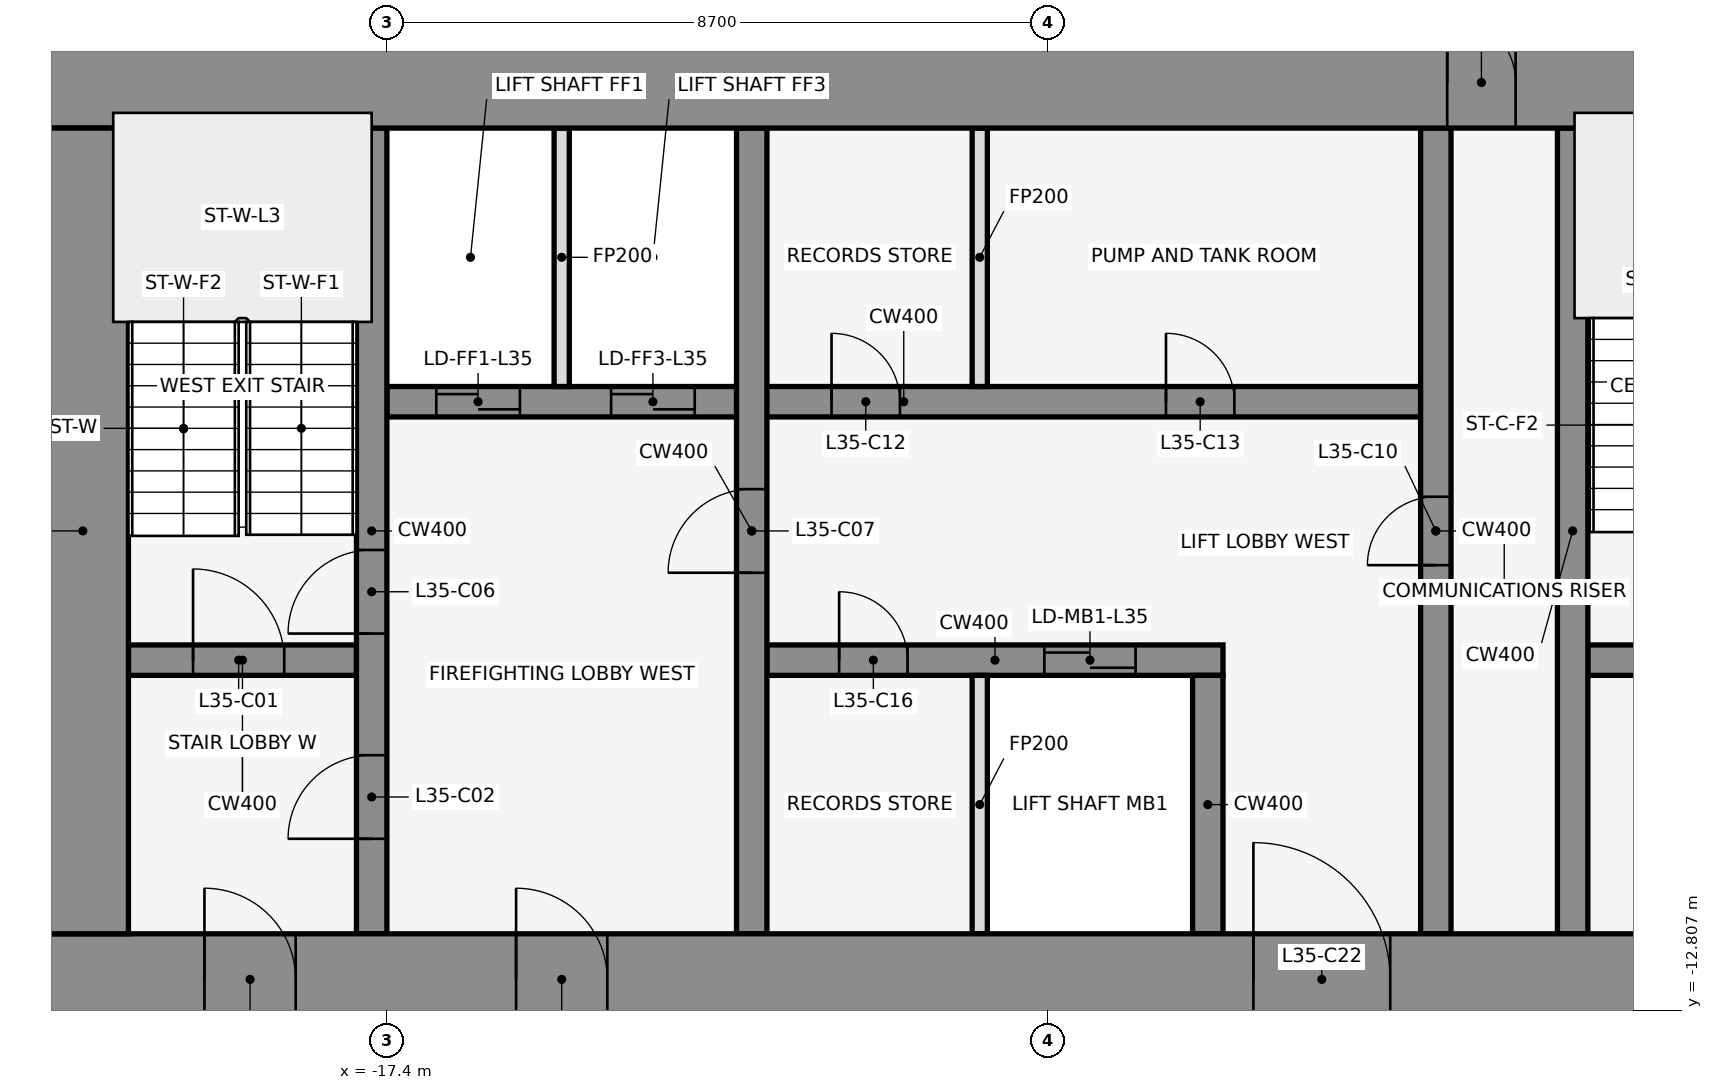
"""IFC4 building model, lengths in metres.
Left out: names, types, materials, properties, quantities, classifications, styles, units other than length and angle.
Written with IfcOpenShell. Run it as: python <this file> out.ifc"""

import sys

from ifc_helpers import new_model, si_unit, direction, frame, frame_2d, origin, place, context, subcontext, project, spatial, rectangle, extrude, element, fill, save


model = new_model("IFC4")
c1 = context("Model", 3, precision=1e-05, world=origin(), true_north=direction((0.0, 1.0)))
c2 = subcontext(c1, "Body", "Model", "MODEL_VIEW")
j1 = project(units=[si_unit("LENGTHUNIT", "METRE"), si_unit("PLANEANGLEUNIT", "RADIAN")], contexts=[c1])
p1 = place(None, origin())
s1 = spatial("IfcSite", under=j1, at=p1, CompositionType="ELEMENT")
p2 = place(p1, origin())
s2 = spatial("IfcBuilding", under=s1, at=p2, CompositionType="ELEMENT")
p3 = place(p2, frame((0.0, 0.0, 160.9)))
s3 = spatial("IfcBuildingStorey", under=s2, at=p3, CompositionType="ELEMENT", Elevation=160.9)
for number, where, z_axis, x_axis in (
    (1, (-0.068, -0.105, 0.0), (0.0, 0.0, 1.0), (-0.84, 0.543, 0.0)),
    (2, (-14.599, 1.08, 0.0), (0.0, 0.0, 1.0), (-0.84, -0.543, 0.0)),
):
    element("IfcWall", number, at=place(p3, frame(where, z_axis=z_axis, x_axis=x_axis)), inside=s3, PredefinedType="STANDARD", context=c2, shape_type="SweptSolid", body=[
        extrude(rectangle(XDim=2.183, YDim=0.25, at=frame_2d((1.091, 0.0))), origin(), (0.0, 0.0, 1.0), 3.95),
    ])
p4 = place(p3, frame((-20.8, -8.2, 0.0), z_axis=(0.0, 0.0, 1.0), x_axis=(1.0, 0.0, 0.0)))
e3 = element("IfcWall", 3, at=p4, inside=s3, PredefinedType="SHEAR", context=c2, shape_type="SweptSolid", body=[
    extrude(rectangle(XDim=3.0, YDim=0.4, at=frame_2d((1.5, 0.0))), origin(), (0.0, 0.0, 1.0), 4.1),
])
p5 = place(p4, frame((0.85, 0.0, 0.0)))
e4 = element("IfcOpeningElement", 4, at=p5, cuts=e3, PredefinedType="OPENING", context=c2, shape_type="SweptSolid", body=[
    extrude(rectangle(XDim=1.2, YDim=2.1, at=frame_2d((0.6, 1.05))), frame((0.0, 0.212, 0.0), z_axis=(0.0, -1.0, 0.0), x_axis=(1.0, 0.0, 0.0)), (0.0, 0.0, 1.0), 0.424),
])
p6 = place(p3, frame((-12.4, -8.2, 0.0), z_axis=(0.0, 0.0, 1.0), x_axis=(1.0, 0.0, 0.0)))
e5 = element("IfcWall", 5, at=p6, inside=s3, PredefinedType="SHEAR", context=c2, shape_type="SweptSolid", body=[
    extrude(rectangle(XDim=6.0, YDim=0.4, at=frame_2d((3.0, 0.0))), origin(), (0.0, 0.0, 1.0), 4.1),
])
p7 = place(p6, frame((3.65, 0.0, 0.0)))
e6 = element("IfcOpeningElement", 6, at=p7, cuts=e5, PredefinedType="OPENING", context=c2, shape_type="SweptSolid", body=[
    extrude(rectangle(XDim=1.2, YDim=2.1, at=frame_2d((0.6, 1.05))), frame((0.0, 0.212, 0.0), z_axis=(0.0, -1.0, 0.0), x_axis=(1.0, 0.0, 0.0)), (0.0, 0.0, 1.0), 0.424),
])
p8 = place(p6, frame((0.95, 0.0, 0.0)))
e7 = element("IfcOpeningElement", 7, at=p8, cuts=e5, PredefinedType="OPENING", context=c2, shape_type="SweptSolid", body=[
    extrude(rectangle(XDim=0.9, YDim=2.1, at=frame_2d((0.45, 1.05))), frame((0.0, 0.212, 0.0), z_axis=(0.0, -1.0, 0.0), x_axis=(1.0, 0.0, 0.0)), (0.0, 0.0, 1.0), 0.424),
])
p9 = place(p3, frame((-1.6, -8.2, 0.0), z_axis=(0.0, 0.0, 1.0), x_axis=(1.0, 0.0, 0.0)))
e8 = element("IfcWall", 8, at=p9, inside=s3, PredefinedType="SHEAR", context=c2, shape_type="SweptSolid", body=[
    extrude(rectangle(XDim=3.2, YDim=0.4, at=frame_2d((1.6, 0.0))), origin(), (0.0, 0.0, 1.0), 4.1),
])
p10 = place(p9, frame((1.05, 0.0, 0.0)))
e9 = element("IfcOpeningElement", 9, at=p10, cuts=e8, PredefinedType="OPENING", context=c2, shape_type="SweptSolid", body=[
    extrude(rectangle(XDim=1.2, YDim=2.1, at=frame_2d((0.6, 1.05))), frame((0.0, 0.212, 0.0), z_axis=(0.0, -1.0, 0.0), x_axis=(1.0, 0.0, 0.0)), (0.0, 0.0, 1.0), 0.424),
])
p11 = place(p3, frame((-17.4, -4.8, 0.0), z_axis=(0.0, 0.0, 1.0), x_axis=(1.0, 0.0, 0.0)))
e10 = element("IfcWall", 10, at=p11, inside=s3, PredefinedType="SHEAR", context=c2, shape_type="SweptSolid", body=[
    extrude(rectangle(XDim=13.6, YDim=0.4, at=frame_2d((6.8, 0.0))), origin(), (0.0, 0.0, 1.0), 4.1),
])
p12 = place(p11, frame((0.65, 0.0, 0.0)))
e11 = element("IfcOpeningElement", 11, at=p12, cuts=e10, PredefinedType="OPENING", context=c2, shape_type="SweptSolid", body=[
    extrude(rectangle(XDim=1.1, YDim=2.1, at=frame_2d((0.55, 1.05))), frame((0.0, 0.212, 0.0), z_axis=(0.0, -1.0, 0.0), x_axis=(1.0, 0.0, 0.0)), (0.0, 0.0, 1.0), 0.424),
])
p13 = place(p11, frame((2.95, 0.0, 0.0)))
e12 = element("IfcOpeningElement", 12, at=p13, cuts=e10, PredefinedType="OPENING", context=c2, shape_type="SweptSolid", body=[
    extrude(rectangle(XDim=1.1, YDim=2.1, at=frame_2d((0.55, 1.05))), frame((0.0, 0.212, 0.0), z_axis=(0.0, -1.0, 0.0), x_axis=(1.0, 0.0, 0.0)), (0.0, 0.0, 1.0), 0.424),
])
p14 = place(p11, frame((5.85, 0.0, 0.0)))
e13 = element("IfcOpeningElement", 13, at=p14, cuts=e10, PredefinedType="OPENING", context=c2, shape_type="SweptSolid", body=[
    extrude(rectangle(XDim=0.9, YDim=2.1, at=frame_2d((0.45, 1.05))), frame((0.0, 0.212, 0.0), z_axis=(0.0, -1.0, 0.0), x_axis=(1.0, 0.0, 0.0)), (0.0, 0.0, 1.0), 0.424),
])
p15 = place(p11, frame((10.25, 0.0, 0.0)))
e14 = element("IfcOpeningElement", 14, at=p15, cuts=e10, PredefinedType="OPENING", context=c2, shape_type="SweptSolid", body=[
    extrude(rectangle(XDim=0.9, YDim=2.1, at=frame_2d((0.45, 1.05))), frame((0.0, 0.212, 0.0), z_axis=(0.0, -1.0, 0.0), x_axis=(1.0, 0.0, 0.0)), (0.0, 0.0, 1.0), 0.424),
])
p16 = place(p3, frame((-17.6, -11.8, 0.0), z_axis=(0.0, 0.0, 1.0), x_axis=(0.0, 1.0, 0.0)))
e15 = element("IfcWall", 15, at=p16, inside=s3, PredefinedType="SHEAR", context=c2, shape_type="SweptSolid", body=[
    extrude(rectangle(XDim=10.6, YDim=0.4, at=frame_2d((5.3, 0.0))), origin(), (0.0, 0.0, 1.0), 4.1),
])
p17 = place(p16, frame((1.25, 0.0, 0.0)))
e16 = element("IfcOpeningElement", 16, at=p17, cuts=e15, PredefinedType="OPENING", context=c2, shape_type="SweptSolid", body=[
    extrude(rectangle(XDim=1.1, YDim=2.1, at=frame_2d((0.55, 1.05))), frame((0.0, 0.212, 0.0), z_axis=(0.0, -1.0, 0.0), x_axis=(1.0, 0.0, 0.0)), (0.0, 0.0, 1.0), 0.424),
])
p18 = place(p16, frame((3.95, 0.0, 0.0)))
e17 = element("IfcOpeningElement", 17, at=p18, cuts=e15, PredefinedType="OPENING", context=c2, shape_type="SweptSolid", body=[
    extrude(rectangle(XDim=1.1, YDim=2.1, at=frame_2d((0.55, 1.05))), frame((0.0, 0.212, 0.0), z_axis=(0.0, -1.0, 0.0), x_axis=(1.0, 0.0, 0.0)), (0.0, 0.0, 1.0), 0.424),
])
p19 = place(p3, frame((-15.1, -4.6, 0.0), z_axis=(0.0, 0.0, 1.0), x_axis=(0.0, 1.0, 0.0)))
e18 = element("IfcWall", 18, at=p19, inside=s3, PredefinedType="PARTITIONING", context=c2, shape_type="SweptSolid", body=[
    extrude(rectangle(XDim=3.4, YDim=0.2, at=frame_2d((1.7, 0.0))), origin(), (0.0, 0.0, 1.0), 2.841),
])
p20 = place(p3, frame((-12.6, -11.8, 0.0), z_axis=(0.0, 0.0, 1.0), x_axis=(0.0, 1.0, 0.0)))
e19 = element("IfcWall", 19, at=p20, inside=s3, PredefinedType="SHEAR", context=c2, shape_type="SweptSolid", body=[
    extrude(rectangle(XDim=10.6, YDim=0.4, at=frame_2d((5.3, 0.0))), origin(), (0.0, 0.0, 1.0), 4.1),
])
p21 = place(p20, frame((4.75, 0.0, 0.0)))
e20 = element("IfcOpeningElement", 20, at=p21, cuts=e19, PredefinedType="OPENING", context=c2, shape_type="SweptSolid", body=[
    extrude(rectangle(XDim=1.1, YDim=2.1, at=frame_2d((0.55, 1.05))), frame((0.0, 0.212, 0.0), z_axis=(0.0, -1.0, 0.0), x_axis=(1.0, 0.0, 0.0)), (0.0, 0.0, 1.0), 0.424),
])
for number, where, z_axis, x_axis in (
    (21, (-9.6, -11.8, 0.0), (0.0, 0.0, 1.0), (0.0, 1.0, 0.0)),
    (22, (-9.6, -4.6, 0.0), (0.0, 0.0, 1.0), (0.0, 1.0, 0.0)),
):
    element("IfcWall", number, at=place(p3, frame(where, z_axis=z_axis, x_axis=x_axis)), inside=s3, PredefinedType="PARTITIONING", context=c2, shape_type="SweptSolid", body=[
        extrude(rectangle(XDim=3.4, YDim=0.2, at=frame_2d((1.7, 0.0))), origin(), (0.0, 0.0, 1.0), 2.841),
    ])
p22 = place(p3, frame((-6.6, -11.8, 0.0), z_axis=(0.0, 0.0, 1.0), x_axis=(0.0, 1.0, 0.0)))
e23 = element("IfcWall", 23, at=p22, inside=s3, PredefinedType="SHEAR", context=c2, shape_type="SweptSolid", body=[
    extrude(rectangle(XDim=3.4, YDim=0.4, at=frame_2d((1.7, 0.0))), origin(), (0.0, 0.0, 1.0), 4.1),
])
p23 = place(p3, frame((-3.6, -11.8, 0.0), z_axis=(0.0, 0.0, 1.0), x_axis=(0.0, 1.0, 0.0)))
e24 = element("IfcWall", 24, at=p23, inside=s3, PredefinedType="SHEAR", context=c2, shape_type="SweptSolid", body=[
    extrude(rectangle(XDim=10.6, YDim=0.4, at=frame_2d((5.3, 0.0))), origin(), (0.0, 0.0, 1.0), 4.1),
])
p24 = place(p23, frame((4.85, 0.0, 0.0)))
e25 = element("IfcOpeningElement", 25, at=p24, cuts=e24, PredefinedType="OPENING", context=c2, shape_type="SweptSolid", body=[
    extrude(rectangle(XDim=0.9, YDim=2.1, at=frame_2d((0.45, 1.05))), frame((0.0, 0.212, 0.0), z_axis=(0.0, -1.0, 0.0), x_axis=(1.0, 0.0, 0.0)), (0.0, 0.0, 1.0), 0.424),
])
p25 = place(p3, frame((-1.8, -11.8, 0.0), z_axis=(0.0, 0.0, 1.0), x_axis=(0.0, 1.0, 0.0)))
e26 = element("IfcWall", 26, at=p25, inside=s3, PredefinedType="SHEAR", context=c2, shape_type="SweptSolid", body=[
    extrude(rectangle(XDim=10.6, YDim=0.4, at=frame_2d((5.3, 0.0))), origin(), (0.0, 0.0, 1.0), 4.1),
])
p26 = place(p3, frame((-22.0, -0.6, 0.0), z_axis=(0.0, 0.0, 1.0), x_axis=(1.0, 0.0, 0.0)))
e27 = element("IfcWall", 27, at=p26, inside=s3, PredefinedType="SHEAR", context=c2, shape_type="SweptSolid", body=[
    extrude(rectangle(XDim=44.0, YDim=1.2, at=frame_2d((22.0, 0.0))), origin(), (0.0, 0.0, 1.0), 4.1),
])
p27 = place(p26, frame((18.55, 0.0, 0.0)))
e28 = element("IfcOpeningElement", 28, at=p27, cuts=e27, PredefinedType="OPENING", context=c2, shape_type="SweptSolid", body=[
    extrude(rectangle(XDim=0.9, YDim=2.1, at=frame_2d((0.45, 1.05))), frame((0.0, 0.612, 0.0), z_axis=(0.0, -1.0, 0.0), x_axis=(1.0, 0.0, 0.0)), (0.0, 0.0, 1.0), 1.224),
])
p28 = place(p26, frame((24.55, 0.0, 0.0)))
e29 = element("IfcOpeningElement", 29, at=p28, cuts=e27, PredefinedType="OPENING", context=c2, shape_type="SweptSolid", body=[
    extrude(rectangle(XDim=0.9, YDim=2.1, at=frame_2d((0.45, 1.05))), frame((0.0, 0.612, 0.0), z_axis=(0.0, -1.0, 0.0), x_axis=(1.0, 0.0, 0.0)), (0.0, 0.0, 1.0), 1.224),
])
p29 = place(p3, frame((-22.0, -12.4, 0.0), z_axis=(0.0, 0.0, 1.0), x_axis=(1.0, 0.0, 0.0)))
e30 = element("IfcWall", 30, at=p29, inside=s3, PredefinedType="SHEAR", context=c2, shape_type="SweptSolid", body=[
    extrude(rectangle(XDim=44.0, YDim=1.2, at=frame_2d((22.0, 0.0))), origin(), (0.0, 0.0, 1.0), 4.1),
])
p30 = place(p29, frame((2.2, 0.0, 0.0)))
e31 = element("IfcOpeningElement", 31, at=p30, cuts=e30, PredefinedType="OPENING", context=c2, shape_type="SweptSolid", body=[
    extrude(rectangle(XDim=1.2, YDim=2.1, at=frame_2d((0.6, 1.05))), frame((0.0, 0.612, 0.0), z_axis=(0.0, -1.0, 0.0), x_axis=(1.0, 0.0, 0.0)), (0.0, 0.0, 1.0), 1.224),
])
p31 = place(p29, frame((21.4, 0.0, 0.0)))
e32 = element("IfcOpeningElement", 32, at=p31, cuts=e30, PredefinedType="OPENING", context=c2, shape_type="SweptSolid", body=[
    extrude(rectangle(XDim=1.2, YDim=2.1, at=frame_2d((0.6, 1.05))), frame((0.0, 0.612, 0.0), z_axis=(0.0, -1.0, 0.0), x_axis=(1.0, 0.0, 0.0)), (0.0, 0.0, 1.0), 1.224),
])
p32 = place(p29, frame((40.6, 0.0, 0.0)))
e33 = element("IfcOpeningElement", 33, at=p32, cuts=e30, PredefinedType="OPENING", context=c2, shape_type="SweptSolid", body=[
    extrude(rectangle(XDim=1.2, YDim=2.1, at=frame_2d((0.6, 1.05))), frame((0.0, 0.612, 0.0), z_axis=(0.0, -1.0, 0.0), x_axis=(1.0, 0.0, 0.0)), (0.0, 0.0, 1.0), 1.224),
])
p33 = place(p29, frame((16.0, 0.0, 0.0)))
e34 = element("IfcOpeningElement", 34, at=p33, cuts=e30, PredefinedType="OPENING", context=c2, shape_type="SweptSolid", body=[
    extrude(rectangle(XDim=1.8, YDim=2.1, at=frame_2d((0.9, 1.05))), frame((0.0, 0.612, 0.0), z_axis=(0.0, -1.0, 0.0), x_axis=(1.0, 0.0, 0.0)), (0.0, 0.0, 1.0), 1.224),
])
p34 = place(p29, frame((6.3, 0.0, 0.0)))
e35 = element("IfcOpeningElement", 35, at=p34, cuts=e30, PredefinedType="OPENING", context=c2, shape_type="SweptSolid", body=[
    extrude(rectangle(XDim=1.2, YDim=2.1, at=frame_2d((0.6, 1.05))), frame((0.0, 0.612, 0.0), z_axis=(0.0, -1.0, 0.0), x_axis=(1.0, 0.0, 0.0)), (0.0, 0.0, 1.0), 1.224),
])
p35 = place(p29, frame((26.2, 0.0, 0.0)))
e36 = element("IfcOpeningElement", 36, at=p35, cuts=e30, PredefinedType="OPENING", context=c2, shape_type="SweptSolid", body=[
    extrude(rectangle(XDim=1.8, YDim=2.1, at=frame_2d((0.9, 1.05))), frame((0.0, 0.612, 0.0), z_axis=(0.0, -1.0, 0.0), x_axis=(1.0, 0.0, 0.0)), (0.0, 0.0, 1.0), 1.224),
])
p36 = place(p29, frame((36.5, 0.0, 0.0)))
e37 = element("IfcOpeningElement", 37, at=p36, cuts=e30, PredefinedType="OPENING", context=c2, shape_type="SweptSolid", body=[
    extrude(rectangle(XDim=1.2, YDim=2.1, at=frame_2d((0.6, 1.05))), frame((0.0, 0.612, 0.0), z_axis=(0.0, -1.0, 0.0), x_axis=(1.0, 0.0, 0.0)), (0.0, 0.0, 1.0), 1.224),
])
p37 = place(p3, frame((-21.4, -11.8, 0.0), z_axis=(0.0, 0.0, 1.0), x_axis=(0.0, 1.0, 0.0)))
e38 = element("IfcWall", 38, at=p37, inside=s3, PredefinedType="SHEAR", context=c2, shape_type="SweptSolid", body=[
    extrude(rectangle(XDim=10.6, YDim=1.2, at=frame_2d((5.3, 0.0))), origin(), (0.0, 0.0, 1.0), 4.1),
])
p38 = place(p5, origin())
e39 = element("IfcDoor", 39, at=p38, inside=s3, OperationType="SINGLE_SWING_LEFT", PredefinedType="DOOR", context=c2, shape_type="SweptSolid", body=[
    extrude(rectangle(XDim=1.2, YDim=2.1, at=frame_2d((0.6, 1.05))), frame((0.0, 0.025, 0.0), z_axis=(0.0, -1.0, 0.0), x_axis=(1.0, 0.0, 0.0)), (0.0, 0.0, 1.0), 0.05),
])
fill(e4, e39)
p39 = place(p17, frame((1.1, 0.0, 0.0), z_axis=(0.0, 0.0, 1.0), x_axis=(-1.0, 0.0, 0.0)))
e40 = element("IfcDoor", 40, at=p39, inside=s3, OperationType="SINGLE_SWING_LEFT", PredefinedType="DOOR", context=c2, shape_type="SweptSolid", body=[
    extrude(rectangle(XDim=1.1, YDim=2.1, at=frame_2d((0.55, 1.05))), frame((0.0, 0.025, 0.0), z_axis=(0.0, -1.0, 0.0), x_axis=(1.0, 0.0, 0.0)), (0.0, 0.0, 1.0), 0.05),
])
fill(e16, e40)
p40 = place(p12, origin())
e41 = element("IfcDoor", 41, at=p40, inside=s3, OperationType="DOUBLE_DOOR_SLIDING", PredefinedType="DOOR", context=c2, shape_type="SweptSolid", body=[
    extrude(rectangle(XDim=1.1, YDim=2.1, at=frame_2d((0.55, 1.05))), frame((0.0, 0.025, 0.0), z_axis=(0.0, -1.0, 0.0), x_axis=(1.0, 0.0, 0.0)), (0.0, 0.0, 1.0), 0.05),
])
fill(e11, e41)
p41 = place(p13, origin())
e42 = element("IfcDoor", 42, at=p41, inside=s3, OperationType="DOUBLE_DOOR_SLIDING", PredefinedType="DOOR", context=c2, shape_type="SweptSolid", body=[
    extrude(rectangle(XDim=1.1, YDim=2.1, at=frame_2d((0.55, 1.05))), frame((0.0, 0.025, 0.0), z_axis=(0.0, -1.0, 0.0), x_axis=(1.0, 0.0, 0.0)), (0.0, 0.0, 1.0), 0.05),
])
fill(e12, e42)
p42 = place(p7, origin())
e43 = element("IfcDoor", 43, at=p42, inside=s3, OperationType="DOUBLE_DOOR_SLIDING", PredefinedType="DOOR", context=c2, shape_type="SweptSolid", body=[
    extrude(rectangle(XDim=1.2, YDim=2.1, at=frame_2d((0.6, 1.05))), frame((0.0, 0.025, 0.0), z_axis=(0.0, -1.0, 0.0), x_axis=(1.0, 0.0, 0.0)), (0.0, 0.0, 1.0), 0.05),
])
fill(e6, e43)
p43 = place(p18, frame((1.1, 0.0, 0.0), z_axis=(0.0, 0.0, 1.0), x_axis=(-1.0, 0.0, 0.0)))
e44 = element("IfcDoor", 44, at=p43, inside=s3, OperationType="SINGLE_SWING_LEFT", PredefinedType="DOOR", context=c2, shape_type="SweptSolid", body=[
    extrude(rectangle(XDim=1.1, YDim=2.1, at=frame_2d((0.55, 1.05))), frame((0.0, 0.025, 0.0), z_axis=(0.0, -1.0, 0.0), x_axis=(1.0, 0.0, 0.0)), (0.0, 0.0, 1.0), 0.05),
])
fill(e17, e44)
p44 = place(p21, origin())
e45 = element("IfcDoor", 45, at=p44, inside=s3, OperationType="SINGLE_SWING_LEFT", PredefinedType="DOOR", context=c2, shape_type="SweptSolid", body=[
    extrude(rectangle(XDim=1.1, YDim=2.1, at=frame_2d((0.55, 1.05))), frame((0.0, 0.025, 0.0), z_axis=(0.0, -1.0, 0.0), x_axis=(1.0, 0.0, 0.0)), (0.0, 0.0, 1.0), 0.05),
])
fill(e20, e45)
p45 = place(p24, frame((0.9, 0.0, 0.0), z_axis=(0.0, 0.0, 1.0), x_axis=(-1.0, 0.0, 0.0)))
e46 = element("IfcDoor", 46, at=p45, inside=s3, OperationType="SINGLE_SWING_LEFT", PredefinedType="DOOR", context=c2, shape_type="SweptSolid", body=[
    extrude(rectangle(XDim=0.9, YDim=2.1, at=frame_2d((0.45, 1.05))), frame((0.0, 0.025, 0.0), z_axis=(0.0, -1.0, 0.0), x_axis=(1.0, 0.0, 0.0)), (0.0, 0.0, 1.0), 0.05),
])
fill(e25, e46)
p46 = place(p14, origin())
e47 = element("IfcDoor", 47, at=p46, inside=s3, OperationType="SINGLE_SWING_RIGHT", PredefinedType="DOOR", context=c2, shape_type="SweptSolid", body=[
    extrude(rectangle(XDim=0.9, YDim=2.1, at=frame_2d((0.45, 1.05))), frame((0.0, 0.025, 0.0), z_axis=(0.0, -1.0, 0.0), x_axis=(1.0, 0.0, 0.0)), (0.0, 0.0, 1.0), 0.05),
])
fill(e13, e47)
p47 = place(p15, origin())
e48 = element("IfcDoor", 48, at=p47, inside=s3, OperationType="SINGLE_SWING_LEFT", PredefinedType="DOOR", context=c2, shape_type="SweptSolid", body=[
    extrude(rectangle(XDim=0.9, YDim=2.1, at=frame_2d((0.45, 1.05))), frame((0.0, 0.025, 0.0), z_axis=(0.0, -1.0, 0.0), x_axis=(1.0, 0.0, 0.0)), (0.0, 0.0, 1.0), 0.05),
])
fill(e14, e48)
p48 = place(p8, frame((0.9, 0.0, 0.0), z_axis=(0.0, 0.0, 1.0), x_axis=(-1.0, 0.0, 0.0)))
e49 = element("IfcDoor", 49, at=p48, inside=s3, OperationType="SINGLE_SWING_LEFT", PredefinedType="DOOR", context=c2, shape_type="SweptSolid", body=[
    extrude(rectangle(XDim=0.9, YDim=2.1, at=frame_2d((0.45, 1.05))), frame((0.0, 0.025, 0.0), z_axis=(0.0, -1.0, 0.0), x_axis=(1.0, 0.0, 0.0)), (0.0, 0.0, 1.0), 0.05),
])
fill(e7, e49)
p49 = place(p27, origin())
e50 = element("IfcDoor", 50, at=p49, inside=s3, OperationType="SINGLE_SWING_LEFT", PredefinedType="DOOR", context=c2, shape_type="SweptSolid", body=[
    extrude(rectangle(XDim=0.9, YDim=2.1, at=frame_2d((0.45, 1.05))), frame((0.0, 0.025, 0.0), z_axis=(0.0, -1.0, 0.0), x_axis=(1.0, 0.0, 0.0)), (0.0, 0.0, 1.0), 0.05),
])
fill(e28, e50)
p50 = place(p30, frame((1.2, 0.0, 0.0), z_axis=(0.0, 0.0, 1.0), x_axis=(-1.0, 0.0, 0.0)))
e51 = element("IfcDoor", 51, at=p50, inside=s3, OperationType="SINGLE_SWING_RIGHT", PredefinedType="DOOR", context=c2, shape_type="SweptSolid", body=[
    extrude(rectangle(XDim=1.2, YDim=2.1, at=frame_2d((0.6, 1.05))), frame((0.0, 0.025, 0.0), z_axis=(0.0, -1.0, 0.0), x_axis=(1.0, 0.0, 0.0)), (0.0, 0.0, 1.0), 0.05),
])
fill(e31, e51)
p51 = place(p33, origin())
e52 = element("IfcDoor", 52, at=p51, inside=s3, OperationType="SINGLE_SWING_LEFT", PredefinedType="DOOR", context=c2, shape_type="SweptSolid", body=[
    extrude(rectangle(XDim=1.8, YDim=2.1, at=frame_2d((0.9, 1.05))), frame((0.0, 0.025, 0.0), z_axis=(0.0, -1.0, 0.0), x_axis=(1.0, 0.0, 0.0)), (0.0, 0.0, 1.0), 0.05),
])
fill(e34, e52)
p52 = place(p34, frame((1.2, 0.0, 0.0), z_axis=(0.0, 0.0, 1.0), x_axis=(-1.0, 0.0, 0.0)))
e53 = element("IfcDoor", 53, at=p52, inside=s3, OperationType="SINGLE_SWING_RIGHT", PredefinedType="DOOR", context=c2, shape_type="SweptSolid", body=[
    extrude(rectangle(XDim=1.2, YDim=2.1, at=frame_2d((0.6, 1.05))), frame((0.0, 0.025, 0.0), z_axis=(0.0, -1.0, 0.0), x_axis=(1.0, 0.0, 0.0)), (0.0, 0.0, 1.0), 0.05),
])
fill(e35, e53)
save(model, sys.argv[1])
